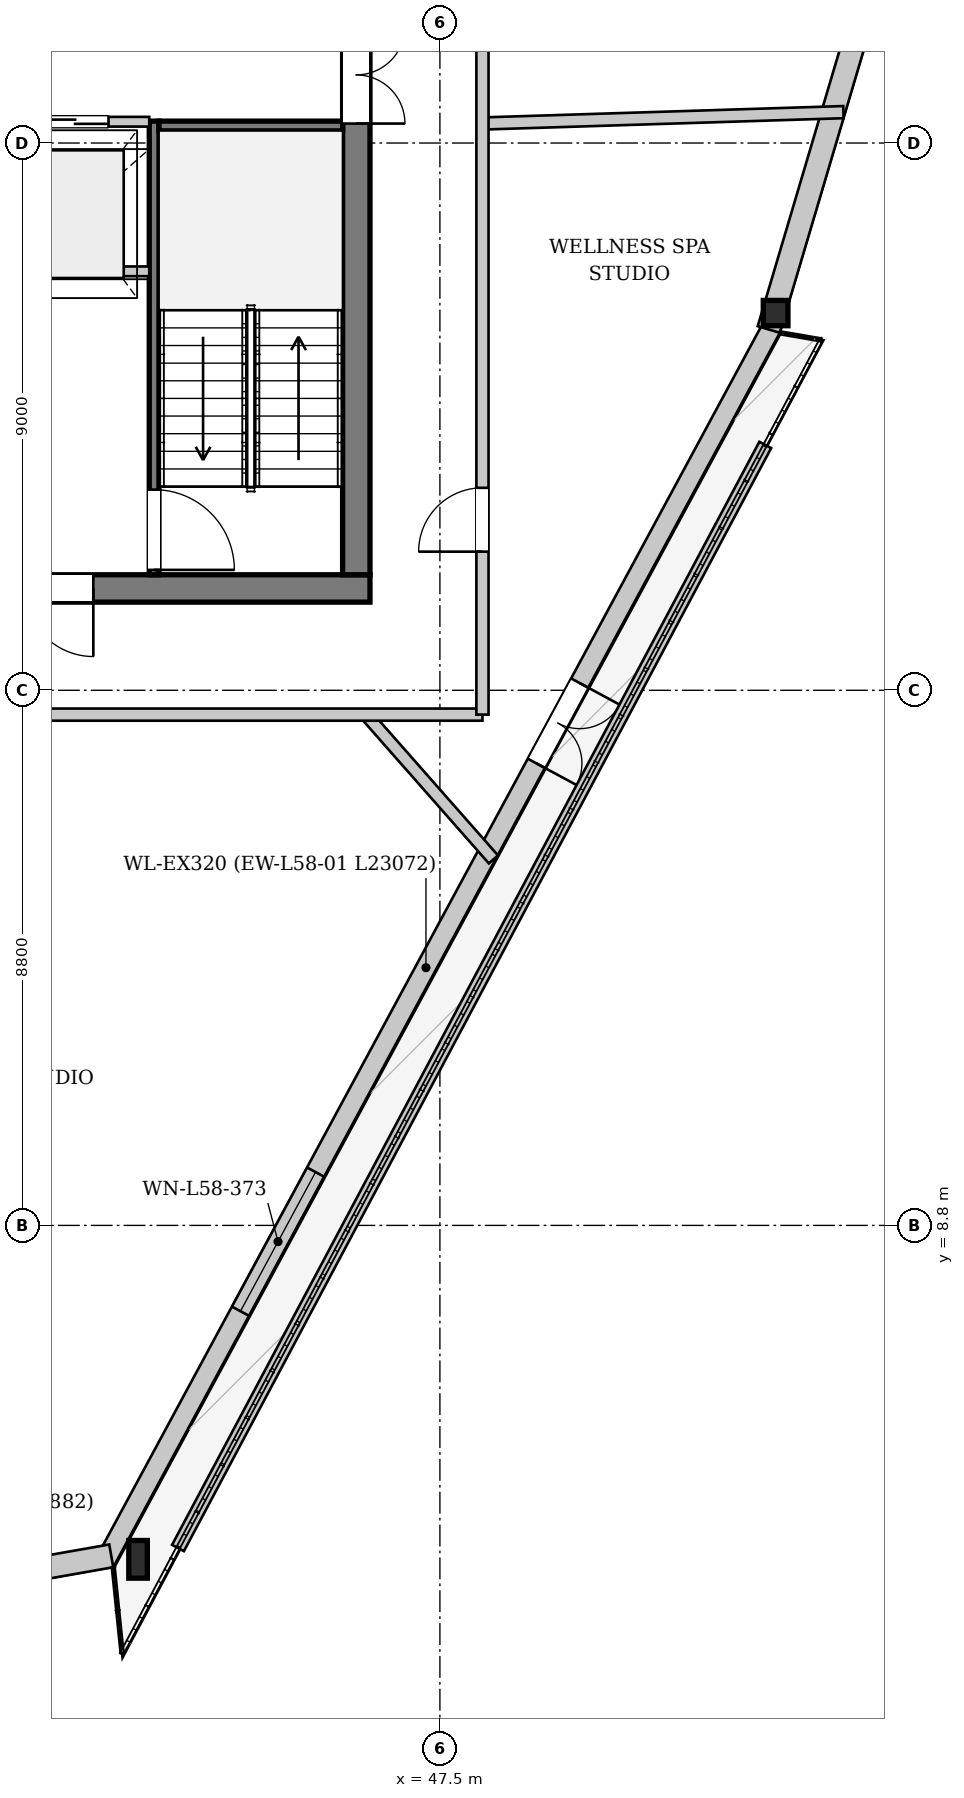
"""IFC4 building model, lengths in metres.
Left out: names, types, materials, properties, quantities, classifications, styles, units other than length and angle.
Written with IfcOpenShell. Run it as: python <this file> out.ifc"""

import sys

from ifc_helpers import new_model, si_unit, direction, frame, frame_2d, origin, origin_2d, place, context, subcontext, project, spatial, rectangle, i_section, extrude, source, transform, mapped, element, fill, save


model = new_model("IFC4")
c1 = context("Model", 3, precision=1e-05, world=origin(), true_north=direction((0.0, 1.0)))
c2 = subcontext(c1, "Body", "Model", "MODEL_VIEW")
j1 = project(units=[si_unit("LENGTHUNIT", "METRE"), si_unit("PLANEANGLEUNIT", "RADIAN")], contexts=[c1])
p1 = place(None, origin())
s1 = spatial("IfcSite", under=j1, at=p1, CompositionType="ELEMENT")
p2 = place(p1, origin())
s2 = spatial("IfcBuilding", under=s1, at=p2, CompositionType="ELEMENT")
p3 = place(p2, frame((0.0, 0.0, 220.25)))
s3 = spatial("IfcBuildingStorey", under=s2, at=p3, CompositionType="ELEMENT", Elevation=220.25)
m1 = source(origin(), c2, "Body", "SweptSolid", [
    extrude(i_section(OverallWidth=0.305, OverallDepth=0.62, WebThickness=0.021, FlangeThickness=0.04, at=origin_2d()), origin(), (0.0, 0.0, 1.0), 3.492),
])
p4 = place(p3, frame((42.128, 3.178, 0.0), z_axis=(0.23360959757, 0.0745369144, 0.969469341607), x_axis=(-0.303968592861, 0.952682053234, 0.0)))
e1 = element("IfcColumn", 1, at=p4, inside=s3, PredefinedType="COLUMN", context=c2, shape_type="MappedRepresentation", body=[
    mapped(m1, transform((0.0, 0.0, 0.0), x_axis=(1.0, 0.0, 0.0), y_axis=(0.0, 1.0, 0.0), z_axis=(0.0, 0.0, 1.0), scale=1.0)),
])
m2 = source(origin(), c2, "Body", "SweptSolid", [
    extrude(i_section(OverallWidth=0.406, OverallDepth=0.416, WebThickness=0.027, FlangeThickness=0.042, at=origin_2d()), origin(), (0.0, 0.0, 1.0), 3.449),
])
p5 = place(p3, frame((53.091, 23.479, 0.0), z_axis=(-0.040486089734, 0.187849793974, 0.981362996776), x_axis=(-0.97755377895, -0.210686044295, 0.0)))
e2 = element("IfcColumn", 2, at=p5, inside=s3, PredefinedType="COLUMN", context=c2, shape_type="MappedRepresentation", body=[
    mapped(m2, transform((0.0, 0.0, 0.0), x_axis=(1.0, 0.0, 0.0), y_axis=(0.0, 1.0, 0.0), z_axis=(0.0, 0.0, 1.0), scale=1.0)),
])
p6 = place(p3, frame((52.95, 23.555, 0.0), z_axis=(0.0, 0.0, 1.0), x_axis=(-0.475160220621, -0.879899292385, 0.0)))
e3 = element("IfcWall", 3, at=p6, inside=s3, PredefinedType="SOLIDWALL", context=c2, shape_type="SweptSolid", body=[
    extrude(rectangle(XDim=23.072, YDim=0.32, at=frame_2d((11.536, 0.0))), origin(), (0.0, 0.0, 1.0), 2.822),
])
p7 = place(p6, frame((6.633, 0.0, 0.0)))
e4 = element("IfcOpeningElement", 4, at=p7, cuts=e3, PredefinedType="OPENING", context=c2, shape_type="SweptSolid", body=[
    extrude(rectangle(XDim=1.5, YDim=2.3, at=frame_2d((0.75, 1.15))), frame((0.0, 0.17, 0.0), z_axis=(0.0, -1.0, 0.0), x_axis=(1.0, 0.0, 0.0)), (0.0, 0.0, 1.0), 0.34),
])
p8 = place(p6, frame((15.773, 0.0, 0.352)))
e5 = element("IfcOpeningElement", 5, at=p8, cuts=e3, PredefinedType="OPENING", context=c2, shape_type="SweptSolid", body=[
    extrude(rectangle(XDim=2.6, YDim=2.35, at=frame_2d((1.3, 1.175))), frame((0.0, 0.17, 0.0), z_axis=(0.0, -1.0, 0.0), x_axis=(1.0, 0.0, 0.0)), (0.0, 0.0, 1.0), 0.34),
])
p9 = place(p3, frame((42.095, 3.365, 0.0), z_axis=(0.0, 0.0, 1.0), x_axis=(-0.984808873563, -0.173641822588, 0.0)))
e6 = element("IfcWall", 6, at=p9, inside=s3, PredefinedType="SOLIDWALL", context=c2, shape_type="SweptSolid", body=[
    extrude(rectangle(XDim=3.882, YDim=0.38, at=frame_2d((1.941, 0.0))), origin(), (0.0, 0.0, 1.0), 2.822),
])
p10 = place(p3, frame((59.474, 45.652, 0.0), z_axis=(0.0, 0.0, 1.0), x_axis=(-0.284530367531, -0.958667027676, 0.0)))
e7 = element("IfcWall", 7, at=p10, inside=s3, PredefinedType="SOLIDWALL", context=c2, shape_type="SweptSolid", body=[
    extrude(rectangle(XDim=23.072, YDim=0.38, at=frame_2d((11.536, 0.0))), origin(), (0.0, 0.0, 1.0), 2.822),
])
p11 = place(p10, frame((5.36, 0.0, 0.452)))
e8 = element("IfcOpeningElement", 8, at=p11, cuts=e7, PredefinedType="OPENING", context=c2, shape_type="SweptSolid", body=[
    extrude(rectangle(XDim=2.2, YDim=2.25, at=frame_2d((1.1, 1.125))), frame((0.0, 0.2, 0.0), z_axis=(0.0, -1.0, 0.0), x_axis=(1.0, 0.0, 0.0)), (0.0, 0.0, 1.0), 0.4),
])
p12 = place(p10, frame((15.512, 0.0, 0.452)))
e9 = element("IfcOpeningElement", 9, at=p12, cuts=e7, PredefinedType="OPENING", context=c2, shape_type="SweptSolid", body=[
    extrude(rectangle(XDim=2.2, YDim=2.25, at=frame_2d((1.1, 1.125))), frame((0.0, 0.2, 0.0), z_axis=(0.0, -1.0, 0.0), x_axis=(1.0, 0.0, 0.0)), (0.0, 0.0, 1.0), 0.4),
])
p13 = place(p3, frame((43.193, 3.495, 0.0), z_axis=(0.0, 0.0, 1.0), x_axis=(0.4699616568, 0.882686830726, 0.0)))
e10 = element("IfcWall", 10, at=p13, inside=s3, PredefinedType="PARAPET", context=c2, shape_type="SweptSolid", body=[
    extrude(rectangle(XDim=20.551, YDim=0.22, at=frame_2d((10.275, 0.0))), origin(), (0.0, 0.0, 1.0), 0.3),
])
p14 = place(p3, frame((46.35, 19.275, 0.0), z_axis=(0.0, 0.0, 1.0), x_axis=(-1.0, 0.0, 0.0)))
e11 = element("IfcWall", 11, at=p14, inside=s3, PredefinedType="SHEAR", context=c2, shape_type="SweptSolid", body=[
    extrude(rectangle(XDim=16.7, YDim=0.45, at=frame_2d((8.35, 0.0))), origin(), (0.0, 0.0, 1.0), 3.33),
])
p15 = place(p14, frame((4.55, 0.0, 0.0)))
e12 = element("IfcOpeningElement", 12, at=p15, cuts=e11, PredefinedType="OPENING", context=c2, shape_type="SweptSolid", body=[
    extrude(rectangle(XDim=1.12, YDim=2.25, at=frame_2d((0.56, 1.125))), frame((0.0, 0.235, 0.0), z_axis=(0.0, -1.0, 0.0), x_axis=(1.0, 0.0, 0.0)), (0.0, 0.0, 1.0), 0.47),
])
p16 = place(p14, frame((11.05, 0.0, 0.0)))
e13 = element("IfcOpeningElement", 13, at=p16, cuts=e11, PredefinedType="OPENING", context=c2, shape_type="SweptSolid", body=[
    extrude(rectangle(XDim=1.12, YDim=2.25, at=frame_2d((0.56, 1.125))), frame((0.0, 0.235, 0.0), z_axis=(0.0, -1.0, 0.0), x_axis=(1.0, 0.0, 0.0)), (0.0, 0.0, 1.0), 0.47),
])
p17 = place(p3, frame((46.125, 33.7, 0.0), z_axis=(0.0, 0.0, 1.0), x_axis=(0.0, -1.0, 0.0)))
e14 = element("IfcWall", 14, at=p17, inside=s3, PredefinedType="SHEAR", context=c2, shape_type="SweptSolid", body=[
    extrude(rectangle(XDim=14.2, YDim=0.45, at=frame_2d((7.1, 0.0))), origin(), (0.0, 0.0, 1.0), 3.33),
])
p18 = place(p17, frame((5.18, 0.0, 0.0)))
e15 = element("IfcOpeningElement", 15, at=p18, cuts=e14, PredefinedType="OPENING", context=c2, shape_type="SweptSolid", body=[
    extrude(rectangle(XDim=1.6, YDim=2.2, at=frame_2d((0.8, 1.1))), frame((0.0, 0.235, 0.0), z_axis=(0.0, -1.0, 0.0), x_axis=(1.0, 0.0, 0.0)), (0.0, 0.0, 1.0), 0.47),
])
p19 = place(p17, frame((2.05, 0.0, 0.0)))
e16 = element("IfcOpeningElement", 16, at=p19, cuts=e14, PredefinedType="OPENING", context=c2, shape_type="SweptSolid", body=[
    extrude(rectangle(XDim=0.95, YDim=2.1, at=frame_2d((0.475, 1.05))), frame((0.0, 0.235, 0.0), z_axis=(0.0, -1.0, 0.0), x_axis=(1.0, 0.0, 0.0)), (0.0, 0.0, 1.0), 0.47),
])
p20 = place(p3, frame((42.8, 26.96, 0.0), z_axis=(0.0, 0.0, 1.0), x_axis=(0.0, -1.0, 0.0)))
e17 = element("IfcWall", 17, at=p20, inside=s3, PredefinedType="PARTITIONING", context=c2, shape_type="SweptSolid", body=[
    extrude(rectangle(XDim=7.46, YDim=0.16, at=frame_2d((3.73, 0.0))), origin(), (0.0, 0.0, 1.0), 3.33),
])
p21 = place(p20, frame((6.06, 0.0, 0.0)))
e18 = element("IfcOpeningElement", 18, at=p21, cuts=e17, PredefinedType="OPENING", context=c2, shape_type="SweptSolid", body=[
    extrude(rectangle(XDim=1.32, YDim=2.2, at=frame_2d((0.66, 1.1))), frame((0.0, 0.09, 0.0), z_axis=(0.0, -1.0, 0.0), x_axis=(1.0, 0.0, 0.0)), (0.0, 0.0, 1.0), 0.18),
])
p22 = place(p3, frame((42.88, 26.88, 0.0), z_axis=(0.0, 0.0, 1.0), x_axis=(1.0, 0.0, 0.0)))
e19 = element("IfcWall", 19, at=p22, inside=s3, PredefinedType="PARTITIONING", context=c2, shape_type="SweptSolid", body=[
    extrude(rectangle(XDim=3.02, YDim=0.16, at=frame_2d((1.51, 0.0))), origin(), (0.0, 0.0, 1.0), 3.33),
])
p23 = place(p3, frame((33.28, 24.49, 0.0), z_axis=(0.0, 0.0, 1.0), x_axis=(1.0, 0.0, 0.0)))
e20 = element("IfcWall", 20, at=p23, inside=s3, PredefinedType="PARTITIONING", context=c2, shape_type="SweptSolid", body=[
    extrude(rectangle(XDim=9.44, YDim=0.16, at=frame_2d((4.72, 0.0))), origin(), (0.0, 0.0, 1.0), 3.33),
])
p24 = place(p3, frame((33.28, 26.95, 0.0), z_axis=(0.0, 0.0, 1.0), x_axis=(1.0, 0.0, 0.0)))
e21 = element("IfcWall", 21, at=p24, inside=s3, PredefinedType="PARTITIONING", context=c2, shape_type="SweptSolid", body=[
    extrude(rectangle(XDim=9.44, YDim=0.16, at=frame_2d((4.72, 0.0))), origin(), (0.0, 0.0, 1.0), 3.33),
])
p25 = place(p24, frame((1.2, 0.0, 0.0)))
e22 = element("IfcOpeningElement", 22, at=p25, cuts=e21, PredefinedType="OPENING", context=c2, shape_type="SweptSolid", body=[
    extrude(rectangle(XDim=0.95, YDim=2.1, at=frame_2d((0.475, 1.05))), frame((0.0, 0.09, 0.0), z_axis=(0.0, -1.0, 0.0), x_axis=(1.0, 0.0, 0.0)), (0.0, 0.0, 1.0), 0.18),
])
p26 = place(p24, frame((4.65, 0.0, 0.0)))
e23 = element("IfcOpeningElement", 23, at=p26, cuts=e21, PredefinedType="OPENING", context=c2, shape_type="SweptSolid", body=[
    extrude(rectangle(XDim=0.95, YDim=2.1, at=frame_2d((0.475, 1.05))), frame((0.0, 0.09, 0.0), z_axis=(0.0, -1.0, 0.0), x_axis=(1.0, 0.0, 0.0)), (0.0, 0.0, 1.0), 0.18),
])
p27 = place(p24, frame((7.67, 0.0, 0.0)))
e24 = element("IfcOpeningElement", 24, at=p27, cuts=e21, PredefinedType="OPENING", context=c2, shape_type="SweptSolid", body=[
    extrude(rectangle(XDim=1.1, YDim=2.2, at=frame_2d((0.55, 1.1))), frame((0.0, 0.09, 0.0), z_axis=(0.0, -1.0, 0.0), x_axis=(1.0, 0.0, 0.0)), (0.0, 0.0, 1.0), 0.18),
])
p28 = place(p3, frame((46.282, 17.2, 0.0), z_axis=(0.0, 0.0, 1.0), x_axis=(0.66111511251, -0.75028448472, 0.0)))
e25 = element("IfcWall", 25, at=p28, inside=s3, PredefinedType="PARTITIONING", context=c2, shape_type="SweptSolid", body=[
    extrude(rectangle(XDim=3.173, YDim=0.2, at=frame_2d((1.587, 0.0))), origin(), (0.0, 0.0, 1.0), 3.33),
])
p29 = place(p3, frame((48.2, 26.921, 0.0), z_axis=(0.0, 0.0, 1.0), x_axis=(0.99950422515, 0.031484979087, 0.0)))
e26 = element("IfcWall", 26, at=p29, inside=s3, PredefinedType="PARTITIONING", context=c2, shape_type="SweptSolid", body=[
    extrude(rectangle(XDim=5.94, YDim=0.2, at=frame_2d((2.97, 0.0))), origin(), (0.0, 0.0, 1.0), 3.33),
])
p30 = place(p3, frame((27.8, 17.2, 0.0), z_axis=(0.0, 0.0, 1.0), x_axis=(1.0, 0.0, 0.0)))
e27 = element("IfcWall", 27, at=p30, inside=s3, PredefinedType="PARTITIONING", context=c2, shape_type="SweptSolid", body=[
    extrude(rectangle(XDim=20.4, YDim=0.2, at=frame_2d((10.2, 0.0))), origin(), (0.0, 0.0, 1.0), 3.33),
])
p31 = place(p30, frame((1.255, 0.0, 0.0)))
e28 = element("IfcOpeningElement", 28, at=p31, cuts=e27, PredefinedType="OPENING", context=c2, shape_type="SweptSolid", body=[
    extrude(rectangle(XDim=1.05, YDim=2.2, at=frame_2d((0.525, 1.1))), frame((0.0, 0.11, 0.0), z_axis=(0.0, -1.0, 0.0), x_axis=(1.0, 0.0, 0.0)), (0.0, 0.0, 1.0), 0.22),
])
p32 = place(p30, frame((11.764, 0.0, 0.0)))
e29 = element("IfcOpeningElement", 29, at=p32, cuts=e27, PredefinedType="OPENING", context=c2, shape_type="SweptSolid", body=[
    extrude(rectangle(XDim=1.05, YDim=2.2, at=frame_2d((0.525, 1.1))), frame((0.0, 0.11, 0.0), z_axis=(0.0, -1.0, 0.0), x_axis=(1.0, 0.0, 0.0)), (0.0, 0.0, 1.0), 0.22),
])
p33 = place(p3, frame((48.2, 17.2, 0.0), z_axis=(0.0, 0.0, 1.0), x_axis=(0.0, 1.0, 0.0)))
e30 = element("IfcWall", 30, at=p33, inside=s3, PredefinedType="PARTITIONING", context=c2, shape_type="SweptSolid", body=[
    extrude(rectangle(XDim=18.8, YDim=0.2, at=frame_2d((9.4, 0.0))), origin(), (0.0, 0.0, 1.0), 3.015),
])
p34 = place(p33, frame((2.68, 0.0, 0.0)))
e31 = element("IfcOpeningElement", 31, at=p34, cuts=e30, PredefinedType="OPENING", context=c2, shape_type="SweptSolid", body=[
    extrude(rectangle(XDim=1.05, YDim=2.2, at=frame_2d((0.525, 1.1))), frame((0.0, 0.11, 0.0), z_axis=(0.0, -1.0, 0.0), x_axis=(1.0, 0.0, 0.0)), (0.0, 0.0, 1.0), 0.22),
])
p35 = place(p33, frame((17.45, 0.0, 0.0)))
e32 = element("IfcOpeningElement", 32, at=p35, cuts=e30, PredefinedType="OPENING", context=c2, shape_type="SweptSolid", body=[
    extrude(rectangle(XDim=1.05, YDim=2.2, at=frame_2d((0.525, 1.1))), frame((0.0, 0.11, 0.0), z_axis=(0.0, -1.0, 0.0), x_axis=(1.0, 0.0, 0.0)), (0.0, 0.0, 1.0), 0.22),
])
m3 = source(origin(), c2, "Body", "SweptSolid", [
    extrude(rectangle(XDim=1.5, YDim=2.3, at=frame_2d((0.75, 1.15))), frame((0.0, 0.025, 0.0), z_axis=(0.0, -1.0, 0.0), x_axis=(1.0, 0.0, 0.0)), (0.0, 0.0, 1.0), 0.05),
])
p36 = place(p7, origin())
e33 = element("IfcDoor", 33, at=p36, inside=s3, OperationType="DOUBLE_DOOR_SINGLE_SWING", PredefinedType="DOOR", context=c2, shape_type="MappedRepresentation", body=[
    mapped(m3, transform((0.0, 0.0, 0.0), x_axis=(1.0, 0.0, 0.0), y_axis=(0.0, 1.0, 0.0), z_axis=(0.0, 0.0, 1.0), scale=1.0)),
])
fill(e4, e33)
m4 = source(origin(), c2, "Body", "SweptSolid", [
    extrude(rectangle(XDim=2.6, YDim=2.35, at=frame_2d((1.3, 1.175))), frame((0.0, 0.03, 0.0), z_axis=(0.0, -1.0, 0.0), x_axis=(1.0, 0.0, 0.0)), (0.0, 0.0, 1.0), 0.06),
])
p37 = place(p8, origin())
e34 = element("IfcWindow", 34, at=p37, inside=s3, PartitioningType="SINGLE_PANEL", PredefinedType="WINDOW", context=c2, shape_type="MappedRepresentation", body=[
    mapped(m4, transform((0.0, 0.0, 0.0), x_axis=(1.0, 0.0, 0.0), y_axis=(0.0, 1.0, 0.0), z_axis=(0.0, 0.0, 1.0), scale=1.0)),
])
fill(e5, e34)
m5 = source(origin(), c2, "Body", "SweptSolid", [
    extrude(rectangle(XDim=1.12, YDim=2.25, at=frame_2d((0.56, 1.125))), frame((0.0, 0.025, 0.0), z_axis=(0.0, -1.0, 0.0), x_axis=(1.0, 0.0, 0.0)), (0.0, 0.0, 1.0), 0.05),
])
p38 = place(p15, origin())
e35 = element("IfcDoor", 35, at=p38, inside=s3, OperationType="SINGLE_SWING_LEFT", PredefinedType="DOOR", context=c2, shape_type="MappedRepresentation", body=[
    mapped(m5, transform((0.0, 0.0, 0.0), x_axis=(1.0, 0.0, 0.0), y_axis=(0.0, 1.0, 0.0), z_axis=(0.0, 0.0, 1.0), scale=1.0)),
])
fill(e12, e35)
m6 = source(origin(), c2, "Body", "SweptSolid", [
    extrude(rectangle(XDim=1.6, YDim=2.2, at=frame_2d((0.8, 1.1))), frame((0.0, 0.025, 0.0), z_axis=(0.0, -1.0, 0.0), x_axis=(1.0, 0.0, 0.0)), (0.0, 0.0, 1.0), 0.05),
])
p39 = place(p18, origin())
e36 = element("IfcDoor", 36, at=p39, inside=s3, OperationType="DOUBLE_DOOR_SINGLE_SWING", PredefinedType="DOOR", context=c2, shape_type="MappedRepresentation", body=[
    mapped(m6, transform((0.0, 0.0, 0.0), x_axis=(1.0, 0.0, 0.0), y_axis=(0.0, 1.0, 0.0), z_axis=(0.0, 0.0, 1.0), scale=1.0)),
])
fill(e15, e36)
m7 = source(origin(), c2, "Body", "SweptSolid", [
    extrude(rectangle(XDim=1.32, YDim=2.2, at=frame_2d((0.66, 1.1))), frame((0.0, 0.025, 0.0), z_axis=(0.0, -1.0, 0.0), x_axis=(1.0, 0.0, 0.0)), (0.0, 0.0, 1.0), 0.05),
])
p40 = place(p21, origin())
e37 = element("IfcDoor", 37, at=p40, inside=s3, OperationType="SINGLE_SWING_RIGHT", PredefinedType="DOOR", context=c2, shape_type="MappedRepresentation", body=[
    mapped(m7, transform((0.0, 0.0, 0.0), x_axis=(1.0, 0.0, 0.0), y_axis=(0.0, 1.0, 0.0), z_axis=(0.0, 0.0, 1.0), scale=1.0)),
])
fill(e18, e37)
m8 = source(origin(), c2, "Body", "SweptSolid", [
    extrude(rectangle(XDim=1.1, YDim=2.2, at=frame_2d((0.55, 1.1))), frame((0.0, 0.025, 0.0), z_axis=(0.0, -1.0, 0.0), x_axis=(1.0, 0.0, 0.0)), (0.0, 0.0, 1.0), 0.05),
])
p41 = place(p27, origin())
e38 = element("IfcDoor", 38, at=p41, inside=s3, OperationType="DOUBLE_DOOR_SLIDING", PredefinedType="DOOR", context=c2, shape_type="MappedRepresentation", body=[
    mapped(m8, transform((0.0, 0.0, 0.0), x_axis=(1.0, 0.0, 0.0), y_axis=(0.0, 1.0, 0.0), z_axis=(0.0, 0.0, 1.0), scale=1.0)),
])
fill(e24, e38)
m9 = source(origin(), c2, "Body", "SweptSolid", [
    extrude(rectangle(XDim=1.05, YDim=2.2, at=frame_2d((0.525, 1.1))), frame((0.0, 0.025, 0.0), z_axis=(0.0, -1.0, 0.0), x_axis=(1.0, 0.0, 0.0)), (0.0, 0.0, 1.0), 0.05),
])
p42 = place(p34, origin())
e39 = element("IfcDoor", 39, at=p42, inside=s3, OperationType="SINGLE_SWING_LEFT", PredefinedType="DOOR", context=c2, shape_type="MappedRepresentation", body=[
    mapped(m9, transform((0.0, 0.0, 0.0), x_axis=(1.0, 0.0, 0.0), y_axis=(0.0, 1.0, 0.0), z_axis=(0.0, 0.0, 1.0), scale=1.0)),
])
fill(e31, e39)
save(model, sys.argv[1])
